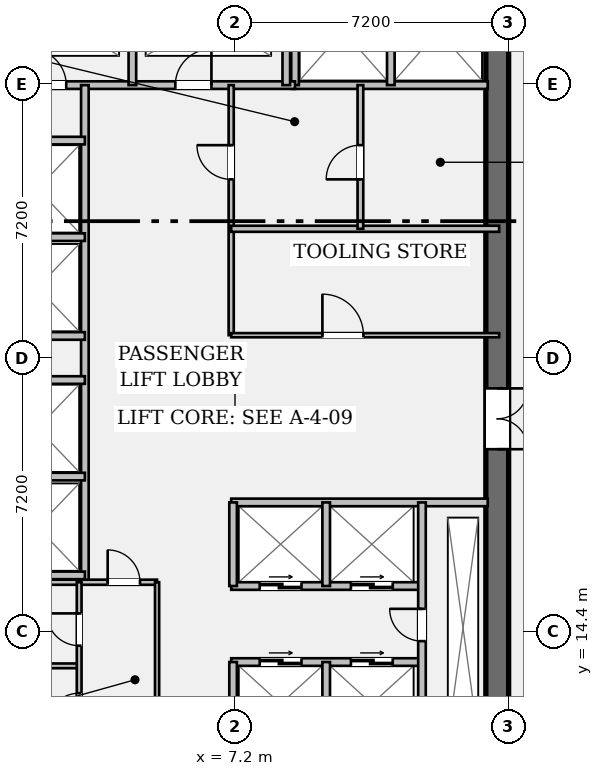
"""IFC4 building model, lengths in metres.
Left out: names, types, materials, properties, quantities, classifications, styles, units other than length and angle.
Written with IfcOpenShell. Run it as: python <this file> out.ifc"""

import sys

from ifc_helpers import new_model, si_unit, direction, frame, frame_2d, origin, place, context, subcontext, project, spatial, rectangle, extrude, element, fill, save


model = new_model("IFC4")
c1 = context("Model", 3, precision=1e-05, world=origin(), true_north=direction((0.0, 1.0)))
c2 = subcontext(c1, "Body", "Model", "MODEL_VIEW")
j1 = project(units=[si_unit("LENGTHUNIT", "METRE"), si_unit("PLANEANGLEUNIT", "RADIAN")], contexts=[c1])
p1 = place(None, origin())
s1 = spatial("IfcSite", under=j1, at=p1, CompositionType="ELEMENT")
p2 = place(p1, origin())
s2 = spatial("IfcBuilding", under=s1, at=p2, CompositionType="ELEMENT")
p3 = place(p2, frame((0.0, 0.0, 163.8)))
s3 = spatial("IfcBuildingStorey", under=s2, at=p3, CompositionType="ELEMENT", Elevation=163.8)
p4 = place(p3, frame((14.1, 35.4, 0.0), z_axis=(0.0, 0.0, 1.0), x_axis=(0.0, -1.0, 0.0)))
e1 = element("IfcWall", 1, at=p4, inside=s3, PredefinedType="SHEAR", context=c2, shape_type="SweptSolid", body=[
    extrude(rectangle(XDim=27.6, YDim=0.6, at=frame_2d((13.8, 0.0))), origin(), (0.0, 0.0, 1.0), 4.6),
])
p5 = place(p4, frame((1.3, 0.0, 0.0)))
e2 = element("IfcOpeningElement", 2, at=p5, cuts=e1, PredefinedType="OPENING", context=c2, shape_type="SweptSolid", body=[
    extrude(rectangle(XDim=1.2, YDim=2.15, at=frame_2d((0.6, 1.075))), frame((0.0, 0.312, 0.0), z_axis=(0.0, -1.0, 0.0), x_axis=(1.0, 0.0, 0.0)), (0.0, 0.0, 1.0), 0.624),
])
p6 = place(p4, frame((25.25, 0.0, 0.0)))
e3 = element("IfcOpeningElement", 3, at=p6, cuts=e1, PredefinedType="OPENING", context=c2, shape_type="SweptSolid", body=[
    extrude(rectangle(XDim=1.2, YDim=2.15, at=frame_2d((0.6, 1.075))), frame((0.0, 0.312, 0.0), z_axis=(0.0, -1.0, 0.0), x_axis=(1.0, 0.0, 0.0)), (0.0, 0.0, 1.0), 0.624),
])
p7 = place(p4, frame((14.6, 0.0, 0.0)))
e4 = element("IfcOpeningElement", 4, at=p7, cuts=e1, PredefinedType="OPENING", context=c2, shape_type="SweptSolid", body=[
    extrude(rectangle(XDim=1.6, YDim=2.2, at=frame_2d((0.8, 1.1))), frame((0.0, 0.312, 0.0), z_axis=(0.0, -1.0, 0.0), x_axis=(1.0, 0.0, 0.0)), (0.0, 0.0, 1.0), 0.624),
])
p8 = place(p3, frame((8.7, 28.78, 0.0), z_axis=(0.0, 0.0, 1.0), x_axis=(1.0, 0.0, 0.0)))
e5 = element("IfcWall", 5, at=p8, inside=s3, PredefinedType="PARTITIONING", context=c2, shape_type="SweptSolid", body=[
    extrude(rectangle(XDim=5.15, YDim=0.2, at=frame_2d((2.575, 0.0))), origin(), (0.0, 0.0, 1.0), 4.6),
])
for number, where, z_axis, x_axis in (
    (6, (8.78, 28.78, 0.0), (0.0, 0.0, 1.0), (0.0, 1.0, 0.0)),
    (7, (11.3, 28.78, 0.0), (0.0, 0.0, 1.0), (0.0, 1.0, 0.0)),
):
    element("IfcWall", number, at=place(p3, frame(where, z_axis=z_axis, x_axis=x_axis)), inside=s3, PredefinedType="PARTITIONING", context=c2, shape_type="SweptSolid", body=[
        extrude(rectangle(XDim=3.1, YDim=0.2, at=frame_2d((1.55, 0.0))), origin(), (0.0, 0.0, 1.0), 4.6),
    ])
p9 = place(p3, frame((0.6, 28.78, 0.0), z_axis=(0.0, 0.0, 1.0), x_axis=(1.0, 0.0, 0.0)))
e8 = element("IfcWall", 8, at=p9, inside=s3, PredefinedType="PARTITIONING", context=c2, shape_type="SweptSolid", body=[
    extrude(rectangle(XDim=8.18, YDim=0.2, at=frame_2d((4.09, 0.0))), origin(), (0.0, 0.0, 1.0), 4.6),
])
p10 = place(p9, frame((1.21, 0.0, 0.0)))
e9 = element("IfcOpeningElement", 9, at=p10, cuts=e8, PredefinedType="OPENING", context=c2, shape_type="SweptSolid", body=[
    extrude(rectangle(XDim=0.95, YDim=2.15, at=frame_2d((0.475, 1.075))), frame((0.0, 0.112, 0.0), z_axis=(0.0, -1.0, 0.0), x_axis=(1.0, 0.0, 0.0)), (0.0, 0.0, 1.0), 0.224),
])
p11 = place(p9, frame((5.03, 0.0, 0.0)))
e10 = element("IfcOpeningElement", 10, at=p11, cuts=e8, PredefinedType="OPENING", context=c2, shape_type="SweptSolid", body=[
    extrude(rectangle(XDim=0.95, YDim=2.15, at=frame_2d((0.475, 1.075))), frame((0.0, 0.112, 0.0), z_axis=(0.0, -1.0, 0.0), x_axis=(1.0, 0.0, 0.0)), (0.0, 0.0, 1.0), 0.224),
])
for number, where, z_axis, x_axis in (
    (11, (4.5, 28.78, 0.0), (0.0, 0.0, 1.0), (0.0, 1.0, 0.0)),
    (12, (8.55, 28.78, 0.0), (0.0, 0.0, 1.0), (0.0, 1.0, 0.0)),
):
    element("IfcWall", number, at=place(p3, frame(where, z_axis=z_axis, x_axis=x_axis)), inside=s3, PredefinedType="PARTITIONING", context=c2, shape_type="SweptSolid", body=[
        extrude(rectangle(XDim=2.94, YDim=0.2, at=frame_2d((1.47, 0.0))), origin(), (0.0, 0.0, 1.0), 4.6),
    ])
p12 = place(p3, frame((3.25, 15.7, 0.0), z_axis=(0.0, 0.0, 1.0), x_axis=(0.0, 1.0, 0.0)))
e13 = element("IfcWall", 13, at=p12, inside=s3, PredefinedType="PARTITIONING", context=c2, shape_type="SweptSolid", body=[
    extrude(rectangle(XDim=13.08, YDim=0.2, at=frame_2d((6.54, 0.0))), origin(), (0.0, 0.0, 1.0), 4.6),
])
for number, where, z_axis, x_axis in (
    (14, (0.6, 15.88, 0.0), (0.0, 0.0, 1.0), (1.0, 0.0, 0.0)),
    (15, (0.6, 18.48, 0.0), (0.0, 0.0, 1.0), (1.0, 0.0, 0.0)),
    (16, (0.6, 22.18, 0.0), (0.0, 0.0, 1.0), (1.0, 0.0, 0.0)),
    (17, (0.6, 24.78, 0.0), (0.0, 0.0, 1.0), (1.0, 0.0, 0.0)),
    (18, (0.6, 21.02, 0.0), (0.0, 0.0, 1.0), (1.0, 0.0, 0.0)),
    (19, (0.6, 27.32, 0.0), (0.0, 0.0, 1.0), (1.0, 0.0, 0.0)),
):
    element("IfcWall", number, at=place(p3, frame(where, z_axis=z_axis, x_axis=x_axis)), inside=s3, PredefinedType="PARTITIONING", context=c2, shape_type="SweptSolid", body=[
        extrude(rectangle(XDim=2.65, YDim=0.2, at=frame_2d((1.325, 0.0))), origin(), (0.0, 0.0, 1.0), 4.6),
    ])
p13 = place(p3, frame((7.1, 22.2, 0.0), z_axis=(0.0, 0.0, 1.0), x_axis=(0.0, 1.0, 0.0)))
e20 = element("IfcWall", 20, at=p13, inside=s3, PredefinedType="PARTITIONING", context=c2, shape_type="SweptSolid", body=[
    extrude(rectangle(XDim=6.58, YDim=0.135, at=frame_2d((3.29, 0.0))), origin(), (0.0, 0.0, 1.0), 4.6),
])
p14 = place(p13, frame((4.1, 0.0, 0.0)))
e21 = element("IfcOpeningElement", 21, at=p14, cuts=e20, PredefinedType="OPENING", context=c2, shape_type="SweptSolid", body=[
    extrude(rectangle(XDim=0.9, YDim=2.15, at=frame_2d((0.45, 1.075))), frame((0.0, 0.08, 0.0), z_axis=(0.0, -1.0, 0.0), x_axis=(1.0, 0.0, 0.0)), (0.0, 0.0, 1.0), 0.159),
])
p15 = place(p3, frame((7.1, 22.2, 0.0), z_axis=(0.0, 0.0, 1.0), x_axis=(1.0, 0.0, 0.0)))
e22 = element("IfcWall", 22, at=p15, inside=s3, PredefinedType="PARTITIONING", context=c2, shape_type="SweptSolid", body=[
    extrude(rectangle(XDim=7.05, YDim=0.11, at=frame_2d((3.525, 0.0))), origin(), (0.0, 0.0, 1.0), 4.6),
])
p16 = place(p15, frame((2.4, 0.0, 0.0)))
e23 = element("IfcOpeningElement", 23, at=p16, cuts=e22, PredefinedType="OPENING", context=c2, shape_type="SweptSolid", body=[
    extrude(rectangle(XDim=1.08, YDim=2.15, at=frame_2d((0.54, 1.075))), frame((0.0, 0.067, 0.0), z_axis=(0.0, -1.0, 0.0), x_axis=(1.0, 0.0, 0.0)), (0.0, 0.0, 1.0), 0.134),
])
p17 = place(p3, frame((7.1, 25.0, 0.0), z_axis=(0.0, 0.0, 1.0), x_axis=(1.0, 0.0, 0.0)))
e24 = element("IfcWall", 24, at=p17, inside=s3, PredefinedType="PARTITIONING", context=c2, shape_type="SweptSolid", body=[
    extrude(rectangle(XDim=7.05, YDim=0.16, at=frame_2d((3.525, 0.0))), origin(), (0.0, 0.0, 1.0), 4.6),
])
p18 = place(p3, frame((10.5, 25.0, 0.0), z_axis=(0.0, 0.0, 1.0), x_axis=(0.0, 1.0, 0.0)))
e25 = element("IfcWall", 25, at=p18, inside=s3, PredefinedType="PARTITIONING", context=c2, shape_type="SweptSolid", body=[
    extrude(rectangle(XDim=3.78, YDim=0.15, at=frame_2d((1.89, 0.0))), origin(), (0.0, 0.0, 1.0), 4.6),
])
p19 = place(p18, frame((1.3, 0.0, 0.0)))
e26 = element("IfcOpeningElement", 26, at=p19, cuts=e25, PredefinedType="OPENING", context=c2, shape_type="SweptSolid", body=[
    extrude(rectangle(XDim=0.9, YDim=2.15, at=frame_2d((0.45, 1.075))), frame((0.0, 0.087, 0.0), z_axis=(0.0, -1.0, 0.0), x_axis=(1.0, 0.0, 0.0)), (0.0, 0.0, 1.0), 0.174),
])
p20 = place(p3, frame((7.1, 17.8, 0.0), z_axis=(0.0, 0.0, 1.0), x_axis=(1.0, 0.0, 0.0)))
e27 = element("IfcWall", 27, at=p20, inside=s3, PredefinedType="PARTITIONING", context=c2, shape_type="SweptSolid", body=[
    extrude(rectangle(XDim=6.75, YDim=0.2, at=frame_2d((3.375, 0.0))), origin(), (0.0, 0.0, 1.0), 4.6),
])
p21 = place(p3, frame((7.1, 15.6, 0.0), z_axis=(0.0, 0.0, 1.0), x_axis=(1.0, 0.0, 0.0)))
e28 = element("IfcWall", 28, at=p21, inside=s3, PredefinedType="PARTITIONING", context=c2, shape_type="SweptSolid", body=[
    extrude(rectangle(XDim=5.02, YDim=0.2, at=frame_2d((2.51, 0.0))), origin(), (0.0, 0.0, 1.0), 4.6),
])
p22 = place(p21, frame((0.75, 0.0, 0.0)))
e29 = element("IfcOpeningElement", 29, at=p22, cuts=e28, PredefinedType="OPENING", context=c2, shape_type="SweptSolid", body=[
    extrude(rectangle(XDim=1.1, YDim=2.2, at=frame_2d((0.55, 1.1))), frame((0.0, 0.112, 0.0), z_axis=(0.0, -1.0, 0.0), x_axis=(1.0, 0.0, 0.0)), (0.0, 0.0, 1.0), 0.224),
])
p23 = place(p21, frame((3.15, 0.0, 0.0)))
e30 = element("IfcOpeningElement", 30, at=p23, cuts=e28, PredefinedType="OPENING", context=c2, shape_type="SweptSolid", body=[
    extrude(rectangle(XDim=1.1, YDim=2.2, at=frame_2d((0.55, 1.1))), frame((0.0, 0.112, 0.0), z_axis=(0.0, -1.0, 0.0), x_axis=(1.0, 0.0, 0.0)), (0.0, 0.0, 1.0), 0.224),
])
p24 = place(p3, frame((7.1, 13.6, 0.0), z_axis=(0.0, 0.0, 1.0), x_axis=(1.0, 0.0, 0.0)))
e31 = element("IfcWall", 31, at=p24, inside=s3, PredefinedType="PARTITIONING", context=c2, shape_type="SweptSolid", body=[
    extrude(rectangle(XDim=5.02, YDim=0.2, at=frame_2d((2.51, 0.0))), origin(), (0.0, 0.0, 1.0), 4.6),
])
p25 = place(p24, frame((0.75, 0.0, 0.0)))
e32 = element("IfcOpeningElement", 32, at=p25, cuts=e31, PredefinedType="OPENING", context=c2, shape_type="SweptSolid", body=[
    extrude(rectangle(XDim=1.1, YDim=2.2, at=frame_2d((0.55, 1.1))), frame((0.0, 0.112, 0.0), z_axis=(0.0, -1.0, 0.0), x_axis=(1.0, 0.0, 0.0)), (0.0, 0.0, 1.0), 0.224),
])
p26 = place(p24, frame((3.15, 0.0, 0.0)))
e33 = element("IfcOpeningElement", 33, at=p26, cuts=e31, PredefinedType="OPENING", context=c2, shape_type="SweptSolid", body=[
    extrude(rectangle(XDim=1.1, YDim=2.2, at=frame_2d((0.55, 1.1))), frame((0.0, 0.112, 0.0), z_axis=(0.0, -1.0, 0.0), x_axis=(1.0, 0.0, 0.0)), (0.0, 0.0, 1.0), 0.224),
])
p27 = place(p3, frame((7.15, 15.6, 0.0), z_axis=(0.0, 0.0, 1.0), x_axis=(0.0, 1.0, 0.0)))
e34 = element("IfcWall", 34, at=p27, inside=s3, PredefinedType="PARTITIONING", context=c2, shape_type="SweptSolid", body=[
    extrude(rectangle(XDim=2.2, YDim=0.2, at=frame_2d((1.1, 0.0))), origin(), (0.0, 0.0, 1.0), 4.6),
])
p28 = place(p3, frame((7.15, 11.2, 0.0), z_axis=(0.0, 0.0, 1.0), x_axis=(0.0, 1.0, 0.0)))
e35 = element("IfcWall", 35, at=p28, inside=s3, PredefinedType="PARTITIONING", context=c2, shape_type="SweptSolid", body=[
    extrude(rectangle(XDim=2.4, YDim=0.2, at=frame_2d((1.2, 0.0))), origin(), (0.0, 0.0, 1.0), 4.6),
])
p29 = place(p3, frame((9.6, 15.6, 0.0), z_axis=(0.0, 0.0, 1.0), x_axis=(0.0, 1.0, 0.0)))
e36 = element("IfcWall", 36, at=p29, inside=s3, PredefinedType="PARTITIONING", context=c2, shape_type="SweptSolid", body=[
    extrude(rectangle(XDim=2.2, YDim=0.2, at=frame_2d((1.1, 0.0))), origin(), (0.0, 0.0, 1.0), 4.6),
])
p30 = place(p3, frame((9.6, 11.2, 0.0), z_axis=(0.0, 0.0, 1.0), x_axis=(0.0, 1.0, 0.0)))
e37 = element("IfcWall", 37, at=p30, inside=s3, PredefinedType="PARTITIONING", context=c2, shape_type="SweptSolid", body=[
    extrude(rectangle(XDim=2.4, YDim=0.2, at=frame_2d((1.2, 0.0))), origin(), (0.0, 0.0, 1.0), 4.6),
])
p31 = place(p3, frame((12.12, 11.2, 0.0), z_axis=(0.0, 0.0, 1.0), x_axis=(0.0, 1.0, 0.0)))
e38 = element("IfcWall", 38, at=p31, inside=s3, PredefinedType="PARTITIONING", context=c2, shape_type="SweptSolid", body=[
    extrude(rectangle(XDim=6.6, YDim=0.2, at=frame_2d((3.3, 0.0))), origin(), (0.0, 0.0, 1.0), 4.6),
])
p32 = place(p31, frame((2.95, 0.0, 0.0)))
e39 = element("IfcOpeningElement", 39, at=p32, cuts=e38, PredefinedType="OPENING", context=c2, shape_type="SweptSolid", body=[
    extrude(rectangle(XDim=0.85, YDim=2.15, at=frame_2d((0.425, 1.075))), frame((0.0, 0.112, 0.0), z_axis=(0.0, -1.0, 0.0), x_axis=(1.0, 0.0, 0.0)), (0.0, 0.0, 1.0), 0.224),
])
p33 = place(p3, frame((0.6, 15.7, 0.0), z_axis=(0.0, 0.0, 1.0), x_axis=(1.0, 0.0, 0.0)))
e40 = element("IfcWall", 40, at=p33, inside=s3, PredefinedType="PARTITIONING", context=c2, shape_type="SweptSolid", body=[
    extrude(rectangle(XDim=4.55, YDim=0.135, at=frame_2d((2.275, 0.0))), origin(), (0.0, 0.0, 1.0), 4.6),
])
p34 = place(p33, frame((3.25, 0.0, 0.0)))
e41 = element("IfcOpeningElement", 41, at=p34, cuts=e40, PredefinedType="OPENING", context=c2, shape_type="SweptSolid", body=[
    extrude(rectangle(XDim=0.85, YDim=2.15, at=frame_2d((0.425, 1.075))), frame((0.0, 0.08, 0.0), z_axis=(0.0, -1.0, 0.0), x_axis=(1.0, 0.0, 0.0)), (0.0, 0.0, 1.0), 0.159),
])
p35 = place(p3, frame((5.15, 11.28, 0.0), z_axis=(0.0, 0.0, 1.0), x_axis=(0.0, 1.0, 0.0)))
e42 = element("IfcWall", 42, at=p35, inside=s3, PredefinedType="PARTITIONING", context=c2, shape_type="SweptSolid", body=[
    extrude(rectangle(XDim=4.42, YDim=0.11, at=frame_2d((2.21, 0.0))), origin(), (0.0, 0.0, 1.0), 4.6),
])
p36 = place(p3, frame((0.6, 13.5, 0.0), z_axis=(0.0, 0.0, 1.0), x_axis=(1.0, 0.0, 0.0)))
e43 = element("IfcWall", 43, at=p36, inside=s3, PredefinedType="PARTITIONING", context=c2, shape_type="SweptSolid", body=[
    extrude(rectangle(XDim=2.5, YDim=0.125, at=frame_2d((1.25, 0.0))), origin(), (0.0, 0.0, 1.0), 4.6),
])
p37 = place(p3, frame((3.1, 11.28, 0.0), z_axis=(0.0, 0.0, 1.0), x_axis=(0.0, 1.0, 0.0)))
e44 = element("IfcWall", 44, at=p37, inside=s3, PredefinedType="PARTITIONING", context=c2, shape_type="SweptSolid", body=[
    extrude(rectangle(XDim=4.42, YDim=0.125, at=frame_2d((2.21, 0.0))), origin(), (0.0, 0.0, 1.0), 4.6),
])
p38 = place(p37, frame((0.65, 0.0, 0.0)))
e45 = element("IfcOpeningElement", 45, at=p38, cuts=e44, PredefinedType="OPENING", context=c2, shape_type="SweptSolid", body=[
    extrude(rectangle(XDim=0.85, YDim=2.15, at=frame_2d((0.425, 1.075))), frame((0.0, 0.074, 0.0), z_axis=(0.0, -1.0, 0.0), x_axis=(1.0, 0.0, 0.0)), (0.0, 0.0, 1.0), 0.149),
])
p39 = place(p37, frame((2.75, 0.0, 0.0)))
e46 = element("IfcOpeningElement", 46, at=p39, cuts=e44, PredefinedType="OPENING", context=c2, shape_type="SweptSolid", body=[
    extrude(rectangle(XDim=0.85, YDim=2.15, at=frame_2d((0.425, 1.075))), frame((0.0, 0.074, 0.0), z_axis=(0.0, -1.0, 0.0), x_axis=(1.0, 0.0, 0.0)), (0.0, 0.0, 1.0), 0.149),
])
p40 = place(p10, origin())
e47 = element("IfcDoor", 47, at=p40, inside=s3, OperationType="SINGLE_SWING_LEFT", PredefinedType="DOOR", context=c2, shape_type="SweptSolid", body=[
    extrude(rectangle(XDim=0.95, YDim=2.15, at=frame_2d((0.475, 1.075))), frame((0.0, 0.025, 0.0), z_axis=(0.0, -1.0, 0.0), x_axis=(1.0, 0.0, 0.0)), (0.0, 0.0, 1.0), 0.05),
])
fill(e9, e47)
p41 = place(p11, origin())
e48 = element("IfcDoor", 48, at=p41, inside=s3, OperationType="SINGLE_SWING_RIGHT", PredefinedType="DOOR", context=c2, shape_type="SweptSolid", body=[
    extrude(rectangle(XDim=0.95, YDim=2.15, at=frame_2d((0.475, 1.075))), frame((0.0, 0.025, 0.0), z_axis=(0.0, -1.0, 0.0), x_axis=(1.0, 0.0, 0.0)), (0.0, 0.0, 1.0), 0.05),
])
fill(e10, e48)
p42 = place(p7, origin())
e49 = element("IfcDoor", 49, at=p42, inside=s3, OperationType="DOUBLE_DOOR_SINGLE_SWING", PredefinedType="DOOR", context=c2, shape_type="SweptSolid", body=[
    extrude(rectangle(XDim=1.6, YDim=2.2, at=frame_2d((0.8, 1.1))), frame((0.0, 0.025, 0.0), z_axis=(0.0, -1.0, 0.0), x_axis=(1.0, 0.0, 0.0)), (0.0, 0.0, 1.0), 0.05),
])
fill(e4, e49)
p43 = place(p16, origin())
e50 = element("IfcDoor", 50, at=p43, inside=s3, OperationType="SINGLE_SWING_LEFT", PredefinedType="DOOR", context=c2, shape_type="SweptSolid", body=[
    extrude(rectangle(XDim=1.08, YDim=2.15, at=frame_2d((0.54, 1.075))), frame((0.0, 0.025, 0.0), z_axis=(0.0, -1.0, 0.0), x_axis=(1.0, 0.0, 0.0)), (0.0, 0.0, 1.0), 0.05),
])
fill(e23, e50)
p44 = place(p14, origin())
e51 = element("IfcDoor", 51, at=p44, inside=s3, OperationType="SINGLE_SWING_RIGHT", PredefinedType="DOOR", context=c2, shape_type="SweptSolid", body=[
    extrude(rectangle(XDim=0.9, YDim=2.15, at=frame_2d((0.45, 1.075))), frame((0.0, 0.025, 0.0), z_axis=(0.0, -1.0, 0.0), x_axis=(1.0, 0.0, 0.0)), (0.0, 0.0, 1.0), 0.05),
])
fill(e21, e51)
p45 = place(p19, origin())
e52 = element("IfcDoor", 52, at=p45, inside=s3, OperationType="SINGLE_SWING_LEFT", PredefinedType="DOOR", context=c2, shape_type="SweptSolid", body=[
    extrude(rectangle(XDim=0.9, YDim=2.15, at=frame_2d((0.45, 1.075))), frame((0.0, 0.025, 0.0), z_axis=(0.0, -1.0, 0.0), x_axis=(1.0, 0.0, 0.0)), (0.0, 0.0, 1.0), 0.05),
])
fill(e26, e52)
p46 = place(p32, origin())
e53 = element("IfcDoor", 53, at=p46, inside=s3, OperationType="SINGLE_SWING_RIGHT", PredefinedType="DOOR", context=c2, shape_type="SweptSolid", body=[
    extrude(rectangle(XDim=0.85, YDim=2.15, at=frame_2d((0.425, 1.075))), frame((0.0, 0.025, 0.0), z_axis=(0.0, -1.0, 0.0), x_axis=(1.0, 0.0, 0.0)), (0.0, 0.0, 1.0), 0.05),
])
fill(e39, e53)
p47 = place(p22, origin())
e54 = element("IfcDoor", 54, at=p47, inside=s3, OperationType="DOUBLE_DOOR_SLIDING", PredefinedType="DOOR", context=c2, shape_type="SweptSolid", body=[
    extrude(rectangle(XDim=1.1, YDim=2.2, at=frame_2d((0.55, 1.1))), frame((0.0, 0.025, 0.0), z_axis=(0.0, -1.0, 0.0), x_axis=(1.0, 0.0, 0.0)), (0.0, 0.0, 1.0), 0.05),
])
fill(e29, e54)
p48 = place(p23, origin())
e55 = element("IfcDoor", 55, at=p48, inside=s3, OperationType="DOUBLE_DOOR_SLIDING", PredefinedType="DOOR", context=c2, shape_type="SweptSolid", body=[
    extrude(rectangle(XDim=1.1, YDim=2.2, at=frame_2d((0.55, 1.1))), frame((0.0, 0.025, 0.0), z_axis=(0.0, -1.0, 0.0), x_axis=(1.0, 0.0, 0.0)), (0.0, 0.0, 1.0), 0.05),
])
fill(e30, e55)
p49 = place(p25, origin())
e56 = element("IfcDoor", 56, at=p49, inside=s3, OperationType="DOUBLE_DOOR_SLIDING", PredefinedType="DOOR", context=c2, shape_type="SweptSolid", body=[
    extrude(rectangle(XDim=1.1, YDim=2.2, at=frame_2d((0.55, 1.1))), frame((0.0, 0.025, 0.0), z_axis=(0.0, -1.0, 0.0), x_axis=(1.0, 0.0, 0.0)), (0.0, 0.0, 1.0), 0.05),
])
fill(e32, e56)
p50 = place(p26, origin())
e57 = element("IfcDoor", 57, at=p50, inside=s3, OperationType="DOUBLE_DOOR_SLIDING", PredefinedType="DOOR", context=c2, shape_type="SweptSolid", body=[
    extrude(rectangle(XDim=1.1, YDim=2.2, at=frame_2d((0.55, 1.1))), frame((0.0, 0.025, 0.0), z_axis=(0.0, -1.0, 0.0), x_axis=(1.0, 0.0, 0.0)), (0.0, 0.0, 1.0), 0.05),
])
fill(e33, e57)
p51 = place(p34, origin())
e58 = element("IfcDoor", 58, at=p51, inside=s3, OperationType="SINGLE_SWING_LEFT", PredefinedType="DOOR", context=c2, shape_type="SweptSolid", body=[
    extrude(rectangle(XDim=0.85, YDim=2.15, at=frame_2d((0.425, 1.075))), frame((0.0, 0.025, 0.0), z_axis=(0.0, -1.0, 0.0), x_axis=(1.0, 0.0, 0.0)), (0.0, 0.0, 1.0), 0.05),
])
fill(e41, e58)
p52 = place(p38, origin())
e59 = element("IfcDoor", 59, at=p52, inside=s3, OperationType="SINGLE_SWING_LEFT", PredefinedType="DOOR", context=c2, shape_type="SweptSolid", body=[
    extrude(rectangle(XDim=0.85, YDim=2.15, at=frame_2d((0.425, 1.075))), frame((0.0, 0.025, 0.0), z_axis=(0.0, -1.0, 0.0), x_axis=(1.0, 0.0, 0.0)), (0.0, 0.0, 1.0), 0.05),
])
fill(e45, e59)
p53 = place(p39, origin())
e60 = element("IfcDoor", 60, at=p53, inside=s3, OperationType="SINGLE_SWING_RIGHT", PredefinedType="DOOR", context=c2, shape_type="SweptSolid", body=[
    extrude(rectangle(XDim=0.85, YDim=2.15, at=frame_2d((0.425, 1.075))), frame((0.0, 0.025, 0.0), z_axis=(0.0, -1.0, 0.0), x_axis=(1.0, 0.0, 0.0)), (0.0, 0.0, 1.0), 0.05),
])
fill(e46, e60)
save(model, sys.argv[1])
